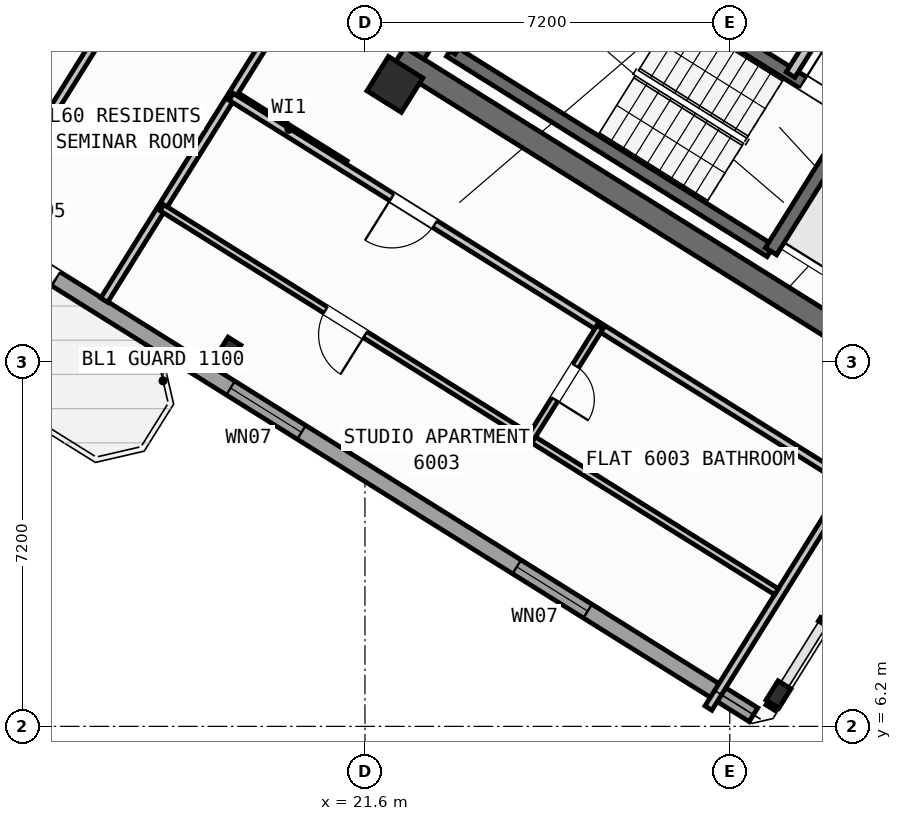
"""IFC4 building model, lengths in metres.
Left out: names, types, materials, properties, quantities, classifications, styles, units other than length and angle.
Written with IfcOpenShell. Run it as: python <this file> out.ifc"""

import sys

from ifc_helpers import new_model, si_unit, direction, frame, frame_2d, origin, origin_2d, place, context, subcontext, project, spatial, rectangle, hollow_rectangle, i_section, extrude, source, transform, mapped, element, fill, save


model = new_model("IFC4")
c1 = context("Model", 3, precision=1e-05, world=origin(), true_north=direction((0.0, 1.0)))
c2 = subcontext(c1, "Body", "Model", "MODEL_VIEW")
j1 = project(units=[si_unit("LENGTHUNIT", "METRE"), si_unit("PLANEANGLEUNIT", "RADIAN")], contexts=[c1])
p1 = place(None, origin())
s1 = spatial("IfcSite", under=j1, at=p1, CompositionType="ELEMENT")
p2 = place(p1, origin())
s2 = spatial("IfcBuilding", under=s1, at=p2, CompositionType="ELEMENT")
p3 = place(p2, frame((0.0, 0.0, 238.5)))
s3 = spatial("IfcBuildingStorey", under=s2, at=p3, CompositionType="ELEMENT", Elevation=238.5)
p4 = place(p3, frame((33.324, 12.503, 0.0), z_axis=(0.0, 0.0, 1.0), x_axis=(-0.848043529849, 0.529926571782, 0.0)))
e1 = element("IfcWall", 1, at=p4, inside=s3, PredefinedType="SHEAR", context=c2, shape_type="SweptSolid", body=[
    extrude(rectangle(XDim=13.04, YDim=0.45, at=frame_2d((6.52, 0.0))), origin(), (0.0, 0.0, 1.0), 3.35),
])
p5 = place(p3, frame((26.007, 24.976, 0.0), z_axis=(0.0, 0.0, 1.0), x_axis=(-0.529931155655, -0.848040665456, 0.0)))
e2 = element("IfcWall", 2, at=p5, inside=s3, PredefinedType="SHEAR", context=c2, shape_type="SweptSolid", body=[
    extrude(rectangle(XDim=6.475, YDim=0.45, at=frame_2d((3.238, 0.0))), origin(), (0.0, 0.0, 1.0), 3.35),
])
m1 = source(origin(), c2, "Body", "SweptSolid", [
    extrude(i_section(OverallWidth=0.3, OverallDepth=0.45, WebThickness=0.014, FlangeThickness=0.026, at=origin_2d()), origin(), (0.0, 0.0, 1.0), 3.6),
])
p6 = place(p3, frame((29.761, 6.829, 0.0), z_axis=(0.0, 0.0, 1.0), x_axis=(-0.848048096156, 0.529919264233, 0.0)))
e3 = element("IfcColumn", 3, at=p6, inside=s3, PredefinedType="COLUMN", context=c2, shape_type="MappedRepresentation", body=[
    mapped(m1, transform((0.0, 0.0, 0.0), scale=1.0)),
])
m2 = source(origin(), c2, "Body", "SweptSolid", [
    extrude(hollow_rectangle(XDim=0.8, YDim=0.8, WallThickness=0.032, at=origin_2d()), origin(), (0.0, 0.0, 1.0), 3.6),
])
p7 = place(p3, frame((22.191, 18.87, 0.0), z_axis=(0.0, 0.0, 1.0), x_axis=(-0.848048096156, 0.529919264233, 0.0)))
e4 = element("IfcColumn", 4, at=p7, inside=s3, PredefinedType="COLUMN", context=c2, shape_type="MappedRepresentation", body=[
    mapped(m2, transform((0.0, 0.0, 0.0), scale=1.0)),
])
p8 = place(p3, frame((18.906, 13.612, 0.0), z_axis=(0.0, 0.0, 1.0), x_axis=(-0.848048096156, 0.529919264233, 0.0)))
e5 = element("IfcColumn", 5, at=p8, inside=s3, PredefinedType="COLUMN", context=c2, shape_type="MappedRepresentation", body=[
    mapped(m1, transform((0.0, 0.0, 0.0), scale=1.0)),
])
p9 = place(p3, frame((29.268, 6.429, 0.0), z_axis=(0.0, 0.0, 1.0), x_axis=(-0.848049971435, 0.529916263149, 0.0)))
e6 = element("IfcWall", 6, at=p9, inside=s3, PredefinedType="STANDARD", context=c2, shape_type="SweptSolid", body=[
    extrude(rectangle(XDim=31.588, YDim=0.32, at=frame_2d((15.794, 0.0))), origin(), (0.0, 0.0, 1.0), 3.35),
])
p10 = place(p9, frame((16.235, 0.0, 0.0)))
e7 = element("IfcOpeningElement", 7, at=p10, cuts=e6, PredefinedType="OPENING", context=c2, shape_type="SweptSolid", body=[
    extrude(rectangle(XDim=1.2, YDim=2.15, at=frame_2d((0.6, 1.075))), frame((0.0, 0.17, 0.0), z_axis=(0.0, -1.0, 0.0), x_axis=(1.0, 0.0, 0.0)), (0.0, 0.0, 1.0), 0.34),
])
p11 = place(p9, frame((3.859, 0.0, 0.9)))
e8 = element("IfcOpeningElement", 8, at=p11, cuts=e6, PredefinedType="OPENING", context=c2, shape_type="SweptSolid", body=[
    extrude(rectangle(XDim=1.65, YDim=1.45, at=frame_2d((0.825, 0.725))), frame((0.0, 0.17, 0.0), z_axis=(0.0, -1.0, 0.0), x_axis=(1.0, 0.0, 0.0)), (0.0, 0.0, 1.0), 0.34),
])
p12 = place(p9, frame((10.519, 0.0, 0.9)))
e9 = element("IfcOpeningElement", 9, at=p12, cuts=e6, PredefinedType="OPENING", context=c2, shape_type="SweptSolid", body=[
    extrude(rectangle(XDim=1.65, YDim=1.45, at=frame_2d((0.825, 0.725))), frame((0.0, 0.17, 0.0), z_axis=(0.0, -1.0, 0.0), x_axis=(1.0, 0.0, 0.0)), (0.0, 0.0, 1.0), 0.34),
])
p13 = place(p9, frame((19.182, 0.0, 1.0)))
e10 = element("IfcOpeningElement", 10, at=p13, cuts=e6, PredefinedType="OPENING", context=c2, shape_type="SweptSolid", body=[
    extrude(rectangle(XDim=0.9, YDim=1.25, at=frame_2d((0.45, 0.625))), frame((0.0, 0.17, 0.0), z_axis=(0.0, -1.0, 0.0), x_axis=(1.0, 0.0, 0.0)), (0.0, 0.0, 1.0), 0.34),
])
p14 = place(p9, frame((22.524, 0.0, 1.0)))
e11 = element("IfcOpeningElement", 11, at=p14, cuts=e6, PredefinedType="OPENING", context=c2, shape_type="SweptSolid", body=[
    extrude(rectangle(XDim=0.9, YDim=1.25, at=frame_2d((0.45, 0.625))), frame((0.0, 0.17, 0.0), z_axis=(0.0, -1.0, 0.0), x_axis=(1.0, 0.0, 0.0)), (0.0, 0.0, 1.0), 0.34),
])
p15 = place(p9, frame((25.658, 0.0, 0.9)))
e12 = element("IfcOpeningElement", 12, at=p15, cuts=e6, PredefinedType="OPENING", context=c2, shape_type="SweptSolid", body=[
    extrude(rectangle(XDim=1.65, YDim=1.45, at=frame_2d((0.825, 0.725))), frame((0.0, 0.17, 0.0), z_axis=(0.0, -1.0, 0.0), x_axis=(1.0, 0.0, 0.0)), (0.0, 0.0, 1.0), 0.34),
])
p16 = place(p9, frame((29.278, 0.0, 0.9)))
e13 = element("IfcOpeningElement", 13, at=p16, cuts=e6, PredefinedType="OPENING", context=c2, shape_type="SweptSolid", body=[
    extrude(rectangle(XDim=1.35, YDim=1.45, at=frame_2d((0.675, 0.725))), frame((0.0, 0.17, 0.0), z_axis=(0.0, -1.0, 0.0), x_axis=(1.0, 0.0, 0.0)), (0.0, 0.0, 1.0), 0.34),
])
p17 = place(p3, frame((29.605, 15.581, 0.0), z_axis=(0.0, 0.0, 1.0), x_axis=(-0.848036911448, 0.529937163087, 0.0)))
e14 = element("IfcWall", 14, at=p17, inside=s3, PredefinedType="SHEAR", context=c2, shape_type="SweptSolid", body=[
    extrude(rectangle(XDim=7.46, YDim=0.26, at=frame_2d((3.73, 0.0))), origin(), (0.0, 0.0, 1.0), 3.35),
])
p18 = place(p3, frame((31.28, 18.261, 0.0), z_axis=(0.0, 0.0, 1.0), x_axis=(-0.848051618787, 0.529913626805, 0.0)))
e15 = element("IfcWall", 15, at=p18, inside=s3, PredefinedType="SHEAR", context=c2, shape_type="SweptSolid", body=[
    extrude(rectangle(XDim=7.46, YDim=0.26, at=frame_2d((3.73, 0.0))), origin(), (0.0, 0.0, 1.0), 3.35),
])
p19 = place(p18, frame((0.36, 0.0, 0.0)))
e16 = element("IfcOpeningElement", 16, at=p19, cuts=e15, PredefinedType="OPENING", context=c2, shape_type="SweptSolid", body=[
    extrude(rectangle(XDim=0.86, YDim=2.05, at=frame_2d((0.43, 1.025))), frame((0.0, 0.14, 0.0), z_axis=(0.0, -1.0, 0.0), x_axis=(1.0, 0.0, 0.0)), (0.0, 0.0, 1.0), 0.28),
])
p20 = place(p3, frame((31.288, 18.256, 0.0), z_axis=(0.0, 0.0, 1.0), x_axis=(-0.529943379326, -0.848033026897, 0.0)))
e17 = element("IfcWall", 17, at=p20, inside=s3, PredefinedType="SHEAR", context=c2, shape_type="SweptSolid", body=[
    extrude(rectangle(XDim=3.16, YDim=0.26, at=frame_2d((1.58, 0.0))), origin(), (0.0, 0.0, 1.0), 3.35),
])
p21 = place(p3, frame((24.945, 22.22, 0.0), z_axis=(0.0, 0.0, 1.0), x_axis=(-0.529908658664, -0.84805472316, 0.0)))
e18 = element("IfcWall", 18, at=p21, inside=s3, PredefinedType="SHEAR", context=c2, shape_type="SweptSolid", body=[
    extrude(rectangle(XDim=3.16, YDim=0.26, at=frame_2d((1.58, 0.0))), origin(), (0.0, 0.0, 1.0), 3.35),
])
p22 = place(p3, frame((31.525, 21.504, 0.0), z_axis=(0.0, 0.0, 1.0), x_axis=(-0.529907497854, -0.848055448493, 0.0)))
e19 = element("IfcWall", 19, at=p22, inside=s3, PredefinedType="STANDARD", context=c2, shape_type="SweptSolid", body=[
    extrude(rectangle(XDim=2.88, YDim=0.2, at=frame_2d((1.44, 0.0))), origin(), (0.0, 0.0, 1.0), 3.34),
])
p23 = place(p3, frame((21.206, 17.292, 0.0), z_axis=(0.0, 0.0, 1.0), x_axis=(-0.848050851465, 0.529914854792, 0.0)))
e20 = element("IfcWall", 20, at=p23, inside=s3, PredefinedType="PARTITIONING", context=c2, shape_type="SweptSolid", body=[
    extrude(rectangle(XDim=2.61, YDim=0.16, at=frame_2d((1.305, 0.0))), origin(), (0.0, 0.0, 1.0), 3.34),
])
p24 = place(p3, frame((21.938, 23.391, 0.0), z_axis=(0.0, 0.0, 1.0), x_axis=(-0.529924725692, -0.848044683434, 0.0)))
e21 = element("IfcWall", 21, at=p24, inside=s3, PredefinedType="PARTITIONING", context=c2, shape_type="SweptSolid", body=[
    extrude(rectangle(XDim=10.35, YDim=0.16, at=frame_2d((5.175, 0.0))), origin(), (0.0, 0.0, 1.0), 3.34),
])
p25 = place(p3, frame((19.529, 24.896, 0.0), z_axis=(0.0, 0.0, 1.0), x_axis=(-0.529914125013, -0.848051307476, 0.0)))
e22 = element("IfcWall", 22, at=p25, inside=s3, PredefinedType="PARTITIONING", context=c2, shape_type="SweptSolid", body=[
    extrude(rectangle(XDim=10.35, YDim=0.16, at=frame_2d((5.175, 0.0))), origin(), (0.0, 0.0, 1.0), 3.34),
])
p26 = place(p3, frame((16.837, 26.579, 0.0), z_axis=(0.0, 0.0, 1.0), x_axis=(-0.529941690036, -0.848034082547, 0.0)))
e23 = element("IfcWall", 23, at=p26, inside=s3, PredefinedType="PARTITIONING", context=c2, shape_type="SweptSolid", body=[
    extrude(rectangle(XDim=10.35, YDim=0.16, at=frame_2d((5.175, 0.0))), origin(), (0.0, 0.0, 1.0), 3.025),
])
p27 = place(p3, frame((32.164, 10.374, 0.0), z_axis=(0.0, 0.0, 1.0), x_axis=(-0.848044107957, 0.529925646633, 0.0)))
e24 = element("IfcWall", 24, at=p27, inside=s3, PredefinedType="PARTITIONING", context=c2, shape_type="SweptSolid", body=[
    extrude(rectangle(XDim=15.57, YDim=0.16, at=frame_2d((7.785, 0.0))), origin(), (0.0, 0.0, 1.0), 3.34),
])
p28 = place(p27, frame((10.83, 0.0, 0.0)))
e25 = element("IfcOpeningElement", 25, at=p28, cuts=e24, PredefinedType="OPENING", context=c2, shape_type="SweptSolid", body=[
    extrude(rectangle(XDim=1.0, YDim=2.1, at=frame_2d((0.5, 1.05))), frame((0.0, 0.09, 0.0), z_axis=(0.0, -1.0, 0.0), x_axis=(1.0, 0.0, 0.0)), (0.0, 0.0, 1.0), 0.18),
])
p29 = place(p3, frame((31.282, 11.208, 0.0), z_axis=(0.0, 0.0, 1.0), x_axis=(-0.529938869374, -0.84803584519, 0.0)))
e26 = element("IfcWall", 26, at=p29, inside=s3, PredefinedType="PARTITIONING", context=c2, shape_type="SweptSolid", body=[
    extrude(rectangle(XDim=5.48, YDim=0.16, at=frame_2d((2.74, 0.0))), origin(), (0.0, 0.0, 1.0), 3.34),
])
p30 = place(p3, frame((29.72, 8.859, 0.0), z_axis=(0.0, 0.0, 1.0), x_axis=(-0.848049134363, 0.529917602752, 0.0)))
e27 = element("IfcWall", 27, at=p30, inside=s3, PredefinedType="PLUMBINGWALL", context=c2, shape_type="SweptSolid", body=[
    extrude(rectangle(XDim=14.3, YDim=0.14, at=frame_2d((7.15, 0.0))), origin(), (0.0, 0.0, 1.0), 3.34),
])
p31 = place(p30, frame((9.57, 0.0, 0.0)))
e28 = element("IfcOpeningElement", 28, at=p31, cuts=e27, PredefinedType="OPENING", context=c2, shape_type="SweptSolid", body=[
    extrude(rectangle(XDim=0.92, YDim=2.08, at=frame_2d((0.46, 1.04))), frame((0.0, 0.08, 0.0), z_axis=(0.0, -1.0, 0.0), x_axis=(1.0, 0.0, 0.0)), (0.0, 0.0, 1.0), 0.16),
])
p32 = place(p3, frame((26.237, 14.078, 0.0), z_axis=(0.0, 0.0, 1.0), x_axis=(-0.52995640672, -0.848024885824, 0.0)))
e29 = element("IfcWall", 29, at=p32, inside=s3, PredefinedType="PLUMBINGWALL", context=c2, shape_type="SweptSolid", body=[
    extrude(rectangle(XDim=2.58, YDim=0.14, at=frame_2d((1.29, 0.0))), origin(), (0.0, 0.0, 1.0), 3.34),
])
p33 = place(p32, frame((0.9, 0.0, 0.0)))
e30 = element("IfcOpeningElement", 30, at=p33, cuts=e29, PredefinedType="OPENING", context=c2, shape_type="SweptSolid", body=[
    extrude(rectangle(XDim=0.78, YDim=2.05, at=frame_2d((0.39, 1.025))), frame((0.0, 0.08, 0.0), z_axis=(0.0, -1.0, 0.0), x_axis=(1.0, 0.0, 0.0)), (0.0, 0.0, 1.0), 0.16),
])
m3 = source(origin(), c2, "Body", "SweptSolid", [
    extrude(rectangle(XDim=1.2, YDim=2.15, at=frame_2d((0.6, 1.075))), frame((0.0, 0.025, 0.0), z_axis=(0.0, -1.0, 0.0), x_axis=(1.0, 0.0, 0.0)), (0.0, 0.0, 1.0), 0.05),
])
p34 = place(p10, origin())
e31 = element("IfcDoor", 31, at=p34, inside=s3, OperationType="SINGLE_SWING_LEFT", PredefinedType="DOOR", context=c2, shape_type="MappedRepresentation", body=[
    mapped(m3, transform((0.0, 0.0, 0.0), scale=1.0)),
])
fill(e7, e31)
m4 = source(origin(), c2, "Body", "SweptSolid", [
    extrude(rectangle(XDim=1.65, YDim=1.45, at=frame_2d((0.825, 0.725))), frame((0.0, 0.03, 0.0), z_axis=(0.0, -1.0, 0.0), x_axis=(1.0, 0.0, 0.0)), (0.0, 0.0, 1.0), 0.06),
])
p35 = place(p11, origin())
e32 = element("IfcWindow", 32, at=p35, inside=s3, PartitioningType="SINGLE_PANEL", PredefinedType="WINDOW", context=c2, shape_type="MappedRepresentation", body=[
    mapped(m4, transform((0.0, 0.0, 0.0), scale=1.0)),
])
fill(e8, e32)
p36 = place(p12, origin())
e33 = element("IfcWindow", 33, at=p36, inside=s3, PartitioningType="SINGLE_PANEL", PredefinedType="WINDOW", context=c2, shape_type="MappedRepresentation", body=[
    mapped(m4, transform((0.0, 0.0, 0.0), scale=1.0)),
])
fill(e9, e33)
m5 = source(origin(), c2, "Body", "SweptSolid", [
    extrude(rectangle(XDim=0.86, YDim=2.05, at=frame_2d((0.43, 1.025))), frame((0.0, 0.025, 0.0), z_axis=(0.0, -1.0, 0.0), x_axis=(1.0, 0.0, 0.0)), (0.0, 0.0, 1.0), 0.05),
])
p37 = place(p19, frame((0.86, 0.0, 0.0), z_axis=(0.0, 0.0, 1.0), x_axis=(-1.0, 0.0, 0.0)))
e34 = element("IfcDoor", 34, at=p37, inside=s3, OperationType="SINGLE_SWING_LEFT", PredefinedType="DOOR", context=c2, shape_type="MappedRepresentation", body=[
    mapped(m5, transform((0.0, 0.0, 0.0), scale=1.0)),
])
fill(e16, e34)
m6 = source(origin(), c2, "Body", "SweptSolid", [
    extrude(rectangle(XDim=1.0, YDim=2.1, at=frame_2d((0.5, 1.05))), frame((0.0, 0.025, 0.0), z_axis=(0.0, -1.0, 0.0), x_axis=(1.0, 0.0, 0.0)), (0.0, 0.0, 1.0), 0.05),
])
p38 = place(p28, origin())
e35 = element("IfcDoor", 35, at=p38, inside=s3, OperationType="SINGLE_SWING_RIGHT", PredefinedType="DOOR", context=c2, shape_type="MappedRepresentation", body=[
    mapped(m6, transform((0.0, 0.0, 0.0), scale=1.0)),
])
fill(e25, e35)
m7 = source(origin(), c2, "Body", "SweptSolid", [
    extrude(rectangle(XDim=0.92, YDim=2.08, at=frame_2d((0.46, 1.04))), frame((0.0, 0.025, 0.0), z_axis=(0.0, -1.0, 0.0), x_axis=(1.0, 0.0, 0.0)), (0.0, 0.0, 1.0), 0.05),
])
p39 = place(p31, origin())
e36 = element("IfcDoor", 36, at=p39, inside=s3, OperationType="SINGLE_SWING_LEFT", PredefinedType="DOOR", context=c2, shape_type="MappedRepresentation", body=[
    mapped(m7, transform((0.0, 0.0, 0.0), scale=1.0)),
])
fill(e28, e36)
m8 = source(origin(), c2, "Body", "SweptSolid", [
    extrude(rectangle(XDim=0.78, YDim=2.05, at=frame_2d((0.39, 1.025))), frame((0.0, 0.025, 0.0), z_axis=(0.0, -1.0, 0.0), x_axis=(1.0, 0.0, 0.0)), (0.0, 0.0, 1.0), 0.05),
])
p40 = place(p33, origin())
e37 = element("IfcDoor", 37, at=p40, inside=s3, OperationType="SINGLE_SWING_RIGHT", PredefinedType="DOOR", context=c2, shape_type="MappedRepresentation", body=[
    mapped(m8, transform((0.0, 0.0, 0.0), scale=1.0)),
])
fill(e30, e37)
save(model, sys.argv[1])
